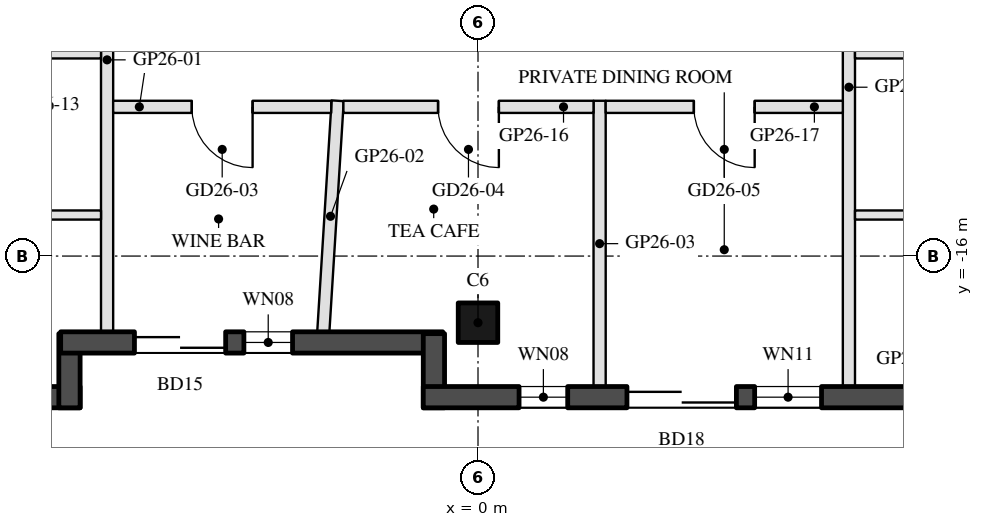
"""IFC4 building model, lengths in metres.
Left out: names, types, materials, properties, quantities, classifications, styles, units other than length and angle.
Written with IfcOpenShell. Run it as: python <this file> out.ifc"""

import sys

from ifc_helpers import new_model, si_unit, direction, frame, frame_2d, origin, origin_2d, place, context, subcontext, project, spatial, rectangle, hollow_rectangle, extrude, boolean, halfspace, element, fill, save


model = new_model("IFC4")
c1 = context("Model", 3, precision=1e-05, world=origin(), true_north=direction((0.0, 1.0)))
c2 = subcontext(c1, "Body", "Model", "MODEL_VIEW")
j1 = project(units=[si_unit("LENGTHUNIT", "METRE"), si_unit("PLANEANGLEUNIT", "RADIAN")], contexts=[c1])
p1 = place(None, origin())
s1 = spatial("IfcSite", under=j1, at=p1, CompositionType="ELEMENT")
p2 = place(p1, origin())
s2 = spatial("IfcBuilding", under=s1, at=p2, CompositionType="ELEMENT")
p3 = place(p2, frame((0.0, 0.0, 272.6)))
s3 = spatial("IfcBuildingStorey", under=s2, at=p3, CompositionType="ELEMENT", Elevation=272.6)
p4 = place(p3, frame((0.0, -17.096, 0.0), z_axis=(0.0, 0.0, 1.0), x_axis=(-1.0, 0.0, 0.0)))
e1 = element("IfcColumn", 1, at=p4, inside=s3, PredefinedType="COLUMN", context=c2, shape_type="SweptSolid", body=[
    boolean("DIFFERENCE", extrude(hollow_rectangle(XDim=0.65, YDim=0.65, WallThickness=0.03, at=origin_2d()), origin(), (0.0, 0.0, 1.0), 3.7), halfspace(frame((0.0, 0.0, 3.663), z_axis=(0.0, 0.0, 1.0), x_axis=(1.0, 0.0, 0.0)), False)),
])
p5 = place(p3, frame((-17.729, -18.321, 0.0), z_axis=(0.0, 0.0, 1.0), x_axis=(1.0, 0.0, 0.0)))
e2 = element("IfcWall", 2, at=p5, inside=s3, PredefinedType="SOLIDWALL", context=c2, shape_type="SweptSolid", body=[
    extrude(rectangle(XDim=11.185, YDim=0.35, at=frame_2d((5.593, 0.0))), origin(), (0.0, 0.0, 1.0), 3.55),
])
p6 = place(p5, frame((0.381, 0.0, 0.3)))
e3 = element("IfcOpeningElement", 3, at=p6, cuts=e2, PredefinedType="OPENING", context=c2, shape_type="SweptSolid", body=[
    extrude(rectangle(XDim=1.7, YDim=2.65, at=frame_2d((0.85, 1.325))), frame((0.0, 0.185, 0.0), z_axis=(0.0, -1.0, 0.0), x_axis=(1.0, 0.0, 0.0)), (0.0, 0.0, 1.0), 0.37),
])
p7 = place(p5, frame((7.21, 0.0, 0.0)))
e4 = element("IfcOpeningElement", 4, at=p7, cuts=e2, PredefinedType="OPENING", context=c2, shape_type="SweptSolid", body=[
    extrude(rectangle(XDim=2.4, YDim=2.4, at=frame_2d((1.2, 1.2))), frame((0.0, 0.185, 0.0), z_axis=(0.0, -1.0, 0.0), x_axis=(1.0, 0.0, 0.0)), (0.0, 0.0, 1.0), 0.37),
])
p8 = place(p5, frame((3.516, 0.0, 0.3)))
e5 = element("IfcOpeningElement", 5, at=p8, cuts=e2, PredefinedType="OPENING", context=c2, shape_type="SweptSolid", body=[
    extrude(rectangle(XDim=1.5, YDim=2.65, at=frame_2d((0.75, 1.325))), frame((0.0, 0.185, 0.0), z_axis=(0.0, -1.0, 0.0), x_axis=(1.0, 0.0, 0.0)), (0.0, 0.0, 1.0), 0.37),
])
p9 = place(p5, frame((5.316, 0.0, 0.3)))
e6 = element("IfcOpeningElement", 6, at=p9, cuts=e2, PredefinedType="OPENING", context=c2, shape_type="SweptSolid", body=[
    extrude(rectangle(XDim=1.5, YDim=2.65, at=frame_2d((0.75, 1.325))), frame((0.0, 0.185, 0.0), z_axis=(0.0, -1.0, 0.0), x_axis=(1.0, 0.0, 0.0)), (0.0, 0.0, 1.0), 0.37),
])
p10 = place(p3, frame((-6.719, -18.496, 0.0), z_axis=(0.0, 0.0, 1.0), x_axis=(0.0, 1.0, 0.0)))
e7 = element("IfcWall", 7, at=p10, inside=s3, PredefinedType="SOLIDWALL", context=c2, shape_type="SweptSolid", body=[
    extrude(rectangle(XDim=1.22, YDim=0.35, at=frame_2d((0.61, 0.0))), origin(), (0.0, 0.0, 1.0), 3.55),
])
p11 = place(p3, frame((-6.864, -17.421, 0.0), z_axis=(0.0, 0.0, 1.0), x_axis=(1.0, 0.0, 0.0)))
e8 = element("IfcWall", 8, at=p11, inside=s3, PredefinedType="SOLIDWALL", context=c2, shape_type="SweptSolid", body=[
    extrude(rectangle(XDim=6.283, YDim=0.35, at=frame_2d((3.142, 0.0))), origin(), (0.0, 0.0, 1.0), 3.55),
])
p12 = place(p11, frame((1.213, 0.0, 0.0)))
e9 = element("IfcOpeningElement", 9, at=p12, cuts=e8, PredefinedType="OPENING", context=c2, shape_type="SweptSolid", body=[
    extrude(rectangle(XDim=1.5, YDim=2.4, at=frame_2d((0.75, 1.2))), frame((0.0, 0.185, 0.0), z_axis=(0.0, -1.0, 0.0), x_axis=(1.0, 0.0, 0.0)), (0.0, 0.0, 1.0), 0.37),
])
p13 = place(p11, frame((3.013, 0.0, 0.3)))
e10 = element("IfcOpeningElement", 10, at=p13, cuts=e8, PredefinedType="OPENING", context=c2, shape_type="SweptSolid", body=[
    extrude(rectangle(XDim=0.8, YDim=2.65, at=frame_2d((0.4, 1.325))), frame((0.0, 0.185, 0.0), z_axis=(0.0, -1.0, 0.0), x_axis=(1.0, 0.0, 0.0)), (0.0, 0.0, 1.0), 0.37),
])
p14 = place(p3, frame((-0.725, -17.276, 0.0), z_axis=(0.0, 0.0, 1.0), x_axis=(0.0, -1.0, 0.0)))
e11 = element("IfcWall", 11, at=p14, inside=s3, PredefinedType="SOLIDWALL", context=c2, shape_type="SweptSolid", body=[
    extrude(rectangle(XDim=1.22, YDim=0.35, at=frame_2d((0.61, 0.0))), origin(), (0.0, 0.0, 1.0), 3.55),
])
p15 = place(p3, frame((-0.9, -18.321, 0.0), z_axis=(0.0, 0.0, 1.0), x_axis=(1.0, 0.0, 0.0)))
e12 = element("IfcWall", 12, at=p15, inside=s3, PredefinedType="SOLIDWALL", context=c2, shape_type="SweptSolid", body=[
    extrude(rectangle(XDim=9.243, YDim=0.35, at=frame_2d((4.622, 0.0))), origin(), (0.0, 0.0, 1.0), 3.55),
])
p16 = place(p15, frame((1.575, 0.0, 0.3)))
e13 = element("IfcOpeningElement", 13, at=p16, cuts=e12, PredefinedType="OPENING", context=c2, shape_type="SweptSolid", body=[
    extrude(rectangle(XDim=0.8, YDim=2.65, at=frame_2d((0.4, 1.325))), frame((0.0, 0.185, 0.0), z_axis=(0.0, -1.0, 0.0), x_axis=(1.0, 0.0, 0.0)), (0.0, 0.0, 1.0), 0.37),
])
p17 = place(p15, frame((3.35, 0.0, 0.0)))
e14 = element("IfcOpeningElement", 14, at=p17, cuts=e12, PredefinedType="OPENING", context=c2, shape_type="SweptSolid", body=[
    extrude(rectangle(XDim=1.8, YDim=2.4, at=frame_2d((0.9, 1.2))), frame((0.0, 0.185, 0.0), z_axis=(0.0, -1.0, 0.0), x_axis=(1.0, 0.0, 0.0)), (0.0, 0.0, 1.0), 0.37),
])
p18 = place(p15, frame((5.45, 0.0, 0.3)))
e15 = element("IfcOpeningElement", 15, at=p18, cuts=e12, PredefinedType="OPENING", context=c2, shape_type="SweptSolid", body=[
    extrude(rectangle(XDim=1.1, YDim=2.65, at=frame_2d((0.55, 1.325))), frame((0.0, 0.185, 0.0), z_axis=(0.0, -1.0, 0.0), x_axis=(1.0, 0.0, 0.0)), (0.0, 0.0, 1.0), 0.37),
])
p19 = place(p3, frame((-6.1, -17.246, 0.0), z_axis=(0.0, 0.0, 1.0), x_axis=(0.0, 1.0, 0.0)))
e16 = element("IfcWall", 16, at=p19, inside=s3, PredefinedType="PARTITIONING", context=c2, shape_type="SweptSolid", body=[
    extrude(rectangle(XDim=8.946, YDim=0.2, at=frame_2d((4.473, 0.0))), origin(), (0.0, 0.0, 1.0), 3.1),
])
p20 = place(p3, frame((-2.544, -17.246, 0.0), z_axis=(0.0, 0.0, 1.0), x_axis=(0.062070892854, 0.998071743043, 0.0)))
e17 = element("IfcWall", 17, at=p20, inside=s3, PredefinedType="PARTITIONING", context=c2, shape_type="SweptSolid", body=[
    extrude(rectangle(XDim=3.807, YDim=0.2, at=frame_2d((1.904, 0.0))), origin(), (0.0, 0.0, 1.0), 3.1),
])
p21 = place(p3, frame((2.0, -18.146, 0.0), z_axis=(0.0, 0.0, 1.0), x_axis=(0.0, 1.0, 0.0)))
e18 = element("IfcWall", 18, at=p21, inside=s3, PredefinedType="PARTITIONING", context=c2, shape_type="SweptSolid", body=[
    extrude(rectangle(XDim=4.7, YDim=0.2, at=frame_2d((2.35, 0.0))), origin(), (0.0, 0.0, 1.0), 3.1),
])
p22 = place(p3, frame((6.1, -18.146, 0.0), z_axis=(0.0, 0.0, 1.0), x_axis=(0.0, 1.0, 0.0)))
e19 = element("IfcWall", 19, at=p22, inside=s3, PredefinedType="PARTITIONING", context=c2, shape_type="SweptSolid", body=[
    extrude(rectangle(XDim=9.846, YDim=0.2, at=frame_2d((4.923, 0.0))), origin(), (0.0, 0.0, 1.0), 3.1),
])
for number, where, z_axis, x_axis in (
    (20, (-8.05, -15.325, 0.0), (0.0, 0.0, 1.0), (1.0, 0.0, 0.0)),
    (21, (-8.05, -12.675, 0.0), (0.0, 0.0, 1.0), (1.0, 0.0, 0.0)),
):
    element("IfcWall", number, at=place(p3, frame(where, z_axis=z_axis, x_axis=x_axis)), inside=s3, PredefinedType="PARTITIONING", context=c2, shape_type="SweptSolid", body=[
        extrude(rectangle(XDim=1.85, YDim=0.15, at=frame_2d((0.925, 0.0))), origin(), (0.0, 0.0, 1.0), 3.0),
    ])
p23 = place(p3, frame((-2.414, -13.546, 0.0), z_axis=(0.0, 0.0, 1.0), x_axis=(-1.0, 0.0, 0.0)))
e22 = element("IfcWall", 22, at=p23, inside=s3, PredefinedType="PARTITIONING", context=c2, shape_type="SweptSolid", body=[
    extrude(rectangle(XDim=3.586, YDim=0.2, at=frame_2d((1.793, 0.0))), origin(), (0.0, 0.0, 1.0), 3.0),
])
p24 = place(p23, frame((1.293, 0.0, 0.0)))
e23 = element("IfcOpeningElement", 23, at=p24, cuts=e22, PredefinedType="OPENING", context=c2, shape_type="SweptSolid", body=[
    extrude(rectangle(XDim=1.0, YDim=2.1, at=frame_2d((0.5, 1.05))), frame((0.0, 0.11, 0.0), z_axis=(0.0, -1.0, 0.0), x_axis=(1.0, 0.0, 0.0)), (0.0, 0.0, 1.0), 0.22),
])
p25 = place(p3, frame((1.9, -13.546, 0.0), z_axis=(0.0, 0.0, 1.0), x_axis=(-1.0, 0.0, 0.0)))
e24 = element("IfcWall", 24, at=p25, inside=s3, PredefinedType="PARTITIONING", context=c2, shape_type="SweptSolid", body=[
    extrude(rectangle(XDim=4.114, YDim=0.2, at=frame_2d((2.057, 0.0))), origin(), (0.0, 0.0, 1.0), 3.0),
])
p26 = place(p25, frame((1.557, 0.0, 0.0)))
e25 = element("IfcOpeningElement", 25, at=p26, cuts=e24, PredefinedType="OPENING", context=c2, shape_type="SweptSolid", body=[
    extrude(rectangle(XDim=1.0, YDim=2.1, at=frame_2d((0.5, 1.05))), frame((0.0, 0.11, 0.0), z_axis=(0.0, -1.0, 0.0), x_axis=(1.0, 0.0, 0.0)), (0.0, 0.0, 1.0), 0.22),
])
p27 = place(p3, frame((6.0, -13.546, 0.0), z_axis=(0.0, 0.0, 1.0), x_axis=(-1.0, 0.0, 0.0)))
e26 = element("IfcWall", 26, at=p27, inside=s3, PredefinedType="PARTITIONING", context=c2, shape_type="SweptSolid", body=[
    extrude(rectangle(XDim=3.9, YDim=0.2, at=frame_2d((1.95, 0.0))), origin(), (0.0, 0.0, 1.0), 3.0),
])
p28 = place(p27, frame((1.45, 0.0, 0.0)))
e27 = element("IfcOpeningElement", 27, at=p28, cuts=e26, PredefinedType="OPENING", context=c2, shape_type="SweptSolid", body=[
    extrude(rectangle(XDim=1.0, YDim=2.1, at=frame_2d((0.5, 1.05))), frame((0.0, 0.11, 0.0), z_axis=(0.0, -1.0, 0.0), x_axis=(1.0, 0.0, 0.0)), (0.0, 0.0, 1.0), 0.22),
])
for number, where, z_axis, x_axis in (
    (28, (6.2, -15.325, 0.0), (0.0, 0.0, 1.0), (1.0, 0.0, 0.0)),
    (29, (6.2, -12.675, 0.0), (0.0, 0.0, 1.0), (1.0, 0.0, 0.0)),
):
    element("IfcWall", number, at=place(p3, frame(where, z_axis=z_axis, x_axis=x_axis)), inside=s3, PredefinedType="PARTITIONING", context=c2, shape_type="SweptSolid", body=[
        extrude(rectangle(XDim=1.85, YDim=0.15, at=frame_2d((0.925, 0.0))), origin(), (0.0, 0.0, 1.0), 3.0),
    ])
p29 = place(p12, frame((1.5, 0.0, 0.0), z_axis=(0.0, 0.0, 1.0), x_axis=(-1.0, 0.0, 0.0)))
e30 = element("IfcDoor", 30, at=p29, inside=s3, OperationType="SLIDING_TO_LEFT", PredefinedType="DOOR", context=c2, shape_type="SweptSolid", body=[
    extrude(rectangle(XDim=1.5, YDim=2.4, at=frame_2d((0.75, 1.2))), frame((0.0, 0.025, 0.0), z_axis=(0.0, -1.0, 0.0), x_axis=(1.0, 0.0, 0.0)), (0.0, 0.0, 1.0), 0.05),
])
fill(e9, e30)
p30 = place(p13, origin())
e31 = element("IfcWindow", 31, at=p30, inside=s3, PartitioningType="SINGLE_PANEL", PredefinedType="WINDOW", context=c2, shape_type="SweptSolid", body=[
    extrude(rectangle(XDim=0.8, YDim=2.65, at=frame_2d((0.4, 1.325))), frame((0.0, 0.03, 0.0), z_axis=(0.0, -1.0, 0.0), x_axis=(1.0, 0.0, 0.0)), (0.0, 0.0, 1.0), 0.06),
])
fill(e10, e31)
p31 = place(p16, origin())
e32 = element("IfcWindow", 32, at=p31, inside=s3, PartitioningType="SINGLE_PANEL", PredefinedType="WINDOW", context=c2, shape_type="SweptSolid", body=[
    extrude(rectangle(XDim=0.8, YDim=2.65, at=frame_2d((0.4, 1.325))), frame((0.0, 0.03, 0.0), z_axis=(0.0, -1.0, 0.0), x_axis=(1.0, 0.0, 0.0)), (0.0, 0.0, 1.0), 0.06),
])
fill(e13, e32)
p32 = place(p17, frame((1.8, 0.0, 0.0), z_axis=(0.0, 0.0, 1.0), x_axis=(-1.0, 0.0, 0.0)))
e33 = element("IfcDoor", 33, at=p32, inside=s3, OperationType="SLIDING_TO_LEFT", PredefinedType="DOOR", context=c2, shape_type="SweptSolid", body=[
    extrude(rectangle(XDim=1.8, YDim=2.4, at=frame_2d((0.9, 1.2))), frame((0.0, 0.025, 0.0), z_axis=(0.0, -1.0, 0.0), x_axis=(1.0, 0.0, 0.0)), (0.0, 0.0, 1.0), 0.05),
])
fill(e14, e33)
p33 = place(p18, origin())
e34 = element("IfcWindow", 34, at=p33, inside=s3, PartitioningType="SINGLE_PANEL", PredefinedType="WINDOW", context=c2, shape_type="SweptSolid", body=[
    extrude(rectangle(XDim=1.1, YDim=2.65, at=frame_2d((0.55, 1.325))), frame((0.0, 0.03, 0.0), z_axis=(0.0, -1.0, 0.0), x_axis=(1.0, 0.0, 0.0)), (0.0, 0.0, 1.0), 0.06),
])
fill(e15, e34)
p34 = place(p24, origin())
e35 = element("IfcDoor", 35, at=p34, inside=s3, OperationType="SINGLE_SWING_LEFT", PredefinedType="DOOR", context=c2, shape_type="SweptSolid", body=[
    extrude(rectangle(XDim=1.0, YDim=2.1, at=frame_2d((0.5, 1.05))), frame((0.0, 0.025, 0.0), z_axis=(0.0, -1.0, 0.0), x_axis=(1.0, 0.0, 0.0)), (0.0, 0.0, 1.0), 0.05),
])
fill(e23, e35)
p35 = place(p26, origin())
e36 = element("IfcDoor", 36, at=p35, inside=s3, OperationType="SINGLE_SWING_LEFT", PredefinedType="DOOR", context=c2, shape_type="SweptSolid", body=[
    extrude(rectangle(XDim=1.0, YDim=2.1, at=frame_2d((0.5, 1.05))), frame((0.0, 0.025, 0.0), z_axis=(0.0, -1.0, 0.0), x_axis=(1.0, 0.0, 0.0)), (0.0, 0.0, 1.0), 0.05),
])
fill(e25, e36)
p36 = place(p28, origin())
e37 = element("IfcDoor", 37, at=p36, inside=s3, OperationType="SINGLE_SWING_LEFT", PredefinedType="DOOR", context=c2, shape_type="SweptSolid", body=[
    extrude(rectangle(XDim=1.0, YDim=2.1, at=frame_2d((0.5, 1.05))), frame((0.0, 0.025, 0.0), z_axis=(0.0, -1.0, 0.0), x_axis=(1.0, 0.0, 0.0)), (0.0, 0.0, 1.0), 0.05),
])
fill(e27, e37)
save(model, sys.argv[1])
